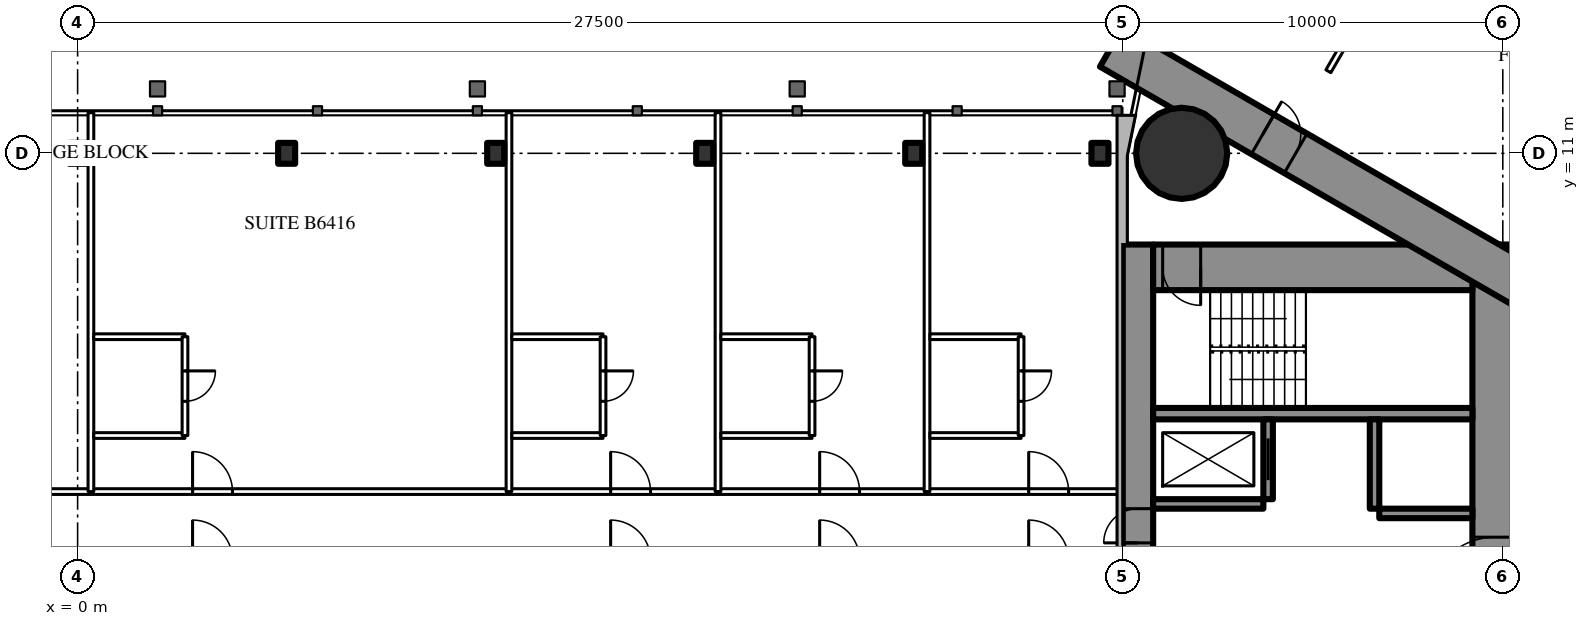
"""IFC4 building model, lengths in metres.
Left out: names, types, materials, properties, quantities, classifications, styles, units other than length and angle.
Written with IfcOpenShell. Run it as: python <this file> out.ifc"""

import sys

from ifc_helpers import new_model, si_unit, direction, frame, frame_2d, origin, origin_2d, place, context, subcontext, project, spatial, rectangle, circle, i_section, extrude, element, fill, save


model = new_model("IFC4")
c1 = context("Model", 3, precision=1e-05, world=origin(), true_north=direction((0.0, 1.0)))
c2 = subcontext(c1, "Body", "Model", "MODEL_VIEW")
j1 = project(units=[si_unit("LENGTHUNIT", "METRE"), si_unit("PLANEANGLEUNIT", "RADIAN")], contexts=[c1])
p1 = place(None, origin())
s1 = spatial("IfcSite", under=j1, at=p1, CompositionType="ELEMENT")
p2 = place(p1, origin())
s2 = spatial("IfcBuilding", under=s1, at=p2, CompositionType="ELEMENT")
p3 = place(p2, frame((0.0, 0.0, 240.5)))
s3 = spatial("IfcBuildingStorey", under=s2, at=p3, CompositionType="ELEMENT", Elevation=240.5)
p4 = place(p3, frame((29.05, 11.0, 0.0), z_axis=(0.0, 0.0, 1.0), x_axis=(1.0, 0.0, 0.0)))
e1 = element("IfcColumn", 1, at=p4, inside=s3, PredefinedType="COLUMN", context=c2, shape_type="SweptSolid", body=[
    extrude(circle(Radius=1.2, at=origin_2d()), origin(), (0.0, 0.0, 1.0), 3.6),
])
p5 = place(p3, frame((27.9, -8.6, 0.0), z_axis=(0.0, 0.0, 1.0), x_axis=(0.0, 1.0, 0.0)))
e2 = element("IfcWall", 2, at=p5, inside=s3, PredefinedType="SHEAR", context=c2, shape_type="SweptSolid", body=[
    extrude(rectangle(XDim=17.2, YDim=0.8, at=frame_2d((8.6, 0.0))), origin(), (0.0, 0.0, 1.0), 3.6),
])
p6 = place(p5, frame((9.35, 0.0, 0.0)))
e3 = element("IfcOpeningElement", 3, at=p6, cuts=e2, PredefinedType="OPENING", context=c2, shape_type="SweptSolid", body=[
    extrude(rectangle(XDim=0.9, YDim=2.2, at=frame_2d((0.45, 1.1))), frame((0.0, 0.41, 0.0), z_axis=(0.0, -1.0, 0.0), x_axis=(1.0, 0.0, 0.0)), (0.0, 0.0, 1.0), 0.82),
])
p7 = place(p3, frame((37.3, -8.6, 0.0), z_axis=(0.0, 0.0, 1.0), x_axis=(0.0, 1.0, 0.0)))
e4 = element("IfcWall", 4, at=p7, inside=s3, PredefinedType="SHEAR", context=c2, shape_type="SweptSolid", body=[
    extrude(rectangle(XDim=17.2, YDim=1.2, at=frame_2d((8.6, 0.0))), origin(), (0.0, 0.0, 1.0), 3.6),
])
p8 = place(p7, frame((7.7, 0.0, 0.0)))
e5 = element("IfcOpeningElement", 5, at=p8, cuts=e4, PredefinedType="OPENING", context=c2, shape_type="SweptSolid", body=[
    extrude(rectangle(XDim=1.8, YDim=2.2, at=frame_2d((0.9, 1.1))), frame((0.0, 0.61, 0.0), z_axis=(0.0, -1.0, 0.0), x_axis=(1.0, 0.0, 0.0)), (0.0, 0.0, 1.0), 1.22),
])
p9 = place(p3, frame((28.3, 8.0, 0.0), z_axis=(0.0, 0.0, 1.0), x_axis=(1.0, 0.0, 0.0)))
e6 = element("IfcWall", 6, at=p9, inside=s3, PredefinedType="SHEAR", context=c2, shape_type="SweptSolid", body=[
    extrude(rectangle(XDim=8.4, YDim=1.2, at=frame_2d((4.2, 0.0))), origin(), (0.0, 0.0, 1.0), 3.6),
])
p10 = place(p9, frame((0.25, 0.0, 0.0)))
e7 = element("IfcOpeningElement", 7, at=p10, cuts=e6, PredefinedType="OPENING", context=c2, shape_type="SweptSolid", body=[
    extrude(rectangle(XDim=1.0, YDim=2.2, at=frame_2d((0.5, 1.1))), frame((0.0, 0.61, 0.0), z_axis=(0.0, -1.0, 0.0), x_axis=(1.0, 0.0, 0.0)), (0.0, 0.0, 1.0), 1.22),
])
p11 = place(p3, frame((28.3, 4.15, 0.0), z_axis=(0.0, 0.0, 1.0), x_axis=(1.0, 0.0, 0.0)))
e8 = element("IfcWall", 8, at=p11, inside=s3, PredefinedType="SHEAR", context=c2, shape_type="SweptSolid", body=[
    extrude(rectangle(XDim=8.4, YDim=0.3, at=frame_2d((4.2, 0.0))), origin(), (0.0, 0.0, 1.0), 3.6),
])
p12 = place(p3, frame((31.325, 1.9, 0.0), z_axis=(0.0, 0.0, 1.0), x_axis=(0.0, 1.0, 0.0)))
e9 = element("IfcWall", 9, at=p12, inside=s3, PredefinedType="SHEAR", context=c2, shape_type="SweptSolid", body=[
    extrude(rectangle(XDim=2.1, YDim=0.25, at=frame_2d((1.05, 0.0))), origin(), (0.0, 0.0, 1.0), 3.6),
])
p13 = place(p12, frame((0.5, 0.0, 0.0)))
e10 = element("IfcOpeningElement", 10, at=p13, cuts=e9, PredefinedType="OPENING", context=c2, shape_type="SweptSolid", body=[
    extrude(rectangle(XDim=1.1, YDim=2.2, at=frame_2d((0.55, 1.1))), frame((0.0, 0.135, 0.0), z_axis=(0.0, -1.0, 0.0), x_axis=(1.0, 0.0, 0.0)), (0.0, 0.0, 1.0), 0.27),
])
p14 = place(p3, frame((34.125, 1.65, 0.0), z_axis=(0.0, 0.0, 1.0), x_axis=(0.0, 1.0, 0.0)))
e11 = element("IfcWall", 11, at=p14, inside=s3, PredefinedType="SHEAR", context=c2, shape_type="SweptSolid", body=[
    extrude(rectangle(XDim=2.35, YDim=0.25, at=frame_2d((1.175, 0.0))), origin(), (0.0, 0.0, 1.0), 3.6),
])
p15 = place(p3, frame((28.3, 1.775, 0.0), z_axis=(0.0, 0.0, 1.0), x_axis=(1.0, 0.0, 0.0)))
e12 = element("IfcWall", 12, at=p15, inside=s3, PredefinedType="SHEAR", context=c2, shape_type="SweptSolid", body=[
    extrude(rectangle(XDim=2.9, YDim=0.25, at=frame_2d((1.45, 0.0))), origin(), (0.0, 0.0, 1.0), 3.6),
])
p16 = place(p3, frame((34.25, 1.525, 0.0), z_axis=(0.0, 0.0, 1.0), x_axis=(1.0, 0.0, 0.0)))
e13 = element("IfcWall", 13, at=p16, inside=s3, PredefinedType="SHEAR", context=c2, shape_type="SweptSolid", body=[
    extrude(rectangle(XDim=2.45, YDim=0.25, at=frame_2d((1.225, 0.0))), origin(), (0.0, 0.0, 1.0), 3.6),
])
p17 = place(p3, frame((27.2, -13.8, 0.0), z_axis=(0.0, 0.0, 1.0), x_axis=(0.866027159892, 0.499996958321, 0.0)))
e14 = element("IfcWall", 14, at=p17, inside=s3, PredefinedType="SHEAR", context=c2, shape_type="SweptSolid", body=[
    extrude(rectangle(XDim=27.947, YDim=1.2, at=frame_2d((13.973, 0.0))), origin(), (0.0, 0.0, 1.0), 3.6),
])
p18 = place(p17, frame((4.6, 0.0, 0.0)))
e15 = element("IfcOpeningElement", 15, at=p18, cuts=e14, PredefinedType="OPENING", context=c2, shape_type="SweptSolid", body=[
    extrude(rectangle(XDim=1.0, YDim=2.2, at=frame_2d((0.5, 1.1))), frame((0.0, 0.61, 0.0), z_axis=(0.0, -1.0, 0.0), x_axis=(1.0, 0.0, 0.0)), (0.0, 0.0, 1.0), 1.22),
])
p19 = place(p17, frame((13.395, 0.0, 0.0)))
e16 = element("IfcOpeningElement", 16, at=p19, cuts=e14, PredefinedType="OPENING", context=c2, shape_type="SweptSolid", body=[
    extrude(rectangle(XDim=1.8, YDim=2.2, at=frame_2d((0.9, 1.1))), frame((0.0, 0.61, 0.0), z_axis=(0.0, -1.0, 0.0), x_axis=(1.0, 0.0, 0.0)), (0.0, 0.0, 1.0), 1.22),
])
p20 = place(p3, frame((27.2, 13.8, 0.0), z_axis=(0.0, 0.0, 1.0), x_axis=(0.866024515034, -0.500001539357, 0.0)))
e17 = element("IfcWall", 17, at=p20, inside=s3, PredefinedType="SHEAR", context=c2, shape_type="SweptSolid", body=[
    extrude(rectangle(XDim=26.907, YDim=1.2, at=frame_2d((13.454, 0.0))), origin(), (0.0, 0.0, 1.0), 3.6),
])
p21 = place(p20, frame((4.6, 0.0, 0.0)))
e18 = element("IfcOpeningElement", 18, at=p21, cuts=e17, PredefinedType="OPENING", context=c2, shape_type="SweptSolid", body=[
    extrude(rectangle(XDim=1.0, YDim=2.2, at=frame_2d((0.5, 1.1))), frame((0.0, 0.61, 0.0), z_axis=(0.0, -1.0, 0.0), x_axis=(1.0, 0.0, 0.0)), (0.0, 0.0, 1.0), 1.22),
])
p22 = place(p20, frame((13.395, 0.0, 0.0)))
e19 = element("IfcOpeningElement", 19, at=p22, cuts=e17, PredefinedType="OPENING", context=c2, shape_type="SweptSolid", body=[
    extrude(rectangle(XDim=1.8, YDim=2.2, at=frame_2d((0.9, 1.1))), frame((0.0, 0.61, 0.0), z_axis=(0.0, -1.0, 0.0), x_axis=(1.0, 0.0, 0.0)), (0.0, 0.0, 1.0), 1.22),
])
for number, where, z_axis, x_axis in (
    (20, (0.0, 11.0, 0.0), (0.0, 0.0, 1.0), (1.0, 0.0, 0.0)),
    (21, (5.5, 11.0, 0.0), (0.0, 0.0, 1.0), (1.0, 0.0, 0.0)),
    (22, (11.0, 11.0, 0.0), (0.0, 0.0, 1.0), (1.0, 0.0, 0.0)),
    (23, (16.5, 11.0, 0.0), (0.0, 0.0, 1.0), (1.0, 0.0, 0.0)),
    (24, (22.0, 11.0, 0.0), (0.0, 0.0, 1.0), (1.0, 0.0, 0.0)),
    (25, (26.9, 11.0, 0.0), (0.0, 0.0, 1.0), (1.0, 0.0, 0.0)),
):
    element("IfcColumn", number, at=place(p3, frame(where, z_axis=z_axis, x_axis=x_axis)), inside=s3, PredefinedType="COLUMN", context=c2, shape_type="SweptSolid", body=[
        extrude(i_section(OverallWidth=0.448, OverallDepth=0.55, WebThickness=0.072, FlangeThickness=0.115, FilletRadius=0.02, at=origin_2d()), origin(), (0.0, 0.0, 1.0), 3.6),
    ])
p23 = place(p3, frame((32.91, 13.159, 0.0), z_axis=(0.0, 0.0, 1.0), x_axis=(0.500014963534, 0.866016764412, 0.0)))
e26 = element("IfcWall", 26, at=p23, inside=s3, PredefinedType="PARTITIONING", context=c2, shape_type="SweptSolid", body=[
    extrude(rectangle(XDim=7.682, YDim=0.15, at=frame_2d((3.841, 0.0))), origin(), (0.0, 0.0, 1.0), 3.35),
])
p24 = place(p3, frame((-10.65, 2.1, 0.0), z_axis=(0.0, 0.0, 1.0), x_axis=(1.0, 0.0, 0.0)))
e27 = element("IfcWall", 27, at=p24, inside=s3, PredefinedType="PARTITIONING", context=c2, shape_type="SweptSolid", body=[
    extrude(rectangle(XDim=38.15, YDim=0.15, at=frame_2d((19.075, 0.0))), origin(), (0.0, 0.0, 1.0), 3.4),
])
p25 = place(p24, frame((2.675, 0.0, 0.0)))
e28 = element("IfcOpeningElement", 28, at=p25, cuts=e27, PredefinedType="OPENING", context=c2, shape_type="SweptSolid", body=[
    extrude(rectangle(XDim=1.05, YDim=2.4, at=frame_2d((0.525, 1.2))), frame((0.0, 0.085, 0.0), z_axis=(0.0, -1.0, 0.0), x_axis=(1.0, 0.0, 0.0)), (0.0, 0.0, 1.0), 0.17),
])
p26 = place(p24, frame((13.675, 0.0, 0.0)))
e29 = element("IfcOpeningElement", 29, at=p26, cuts=e27, PredefinedType="OPENING", context=c2, shape_type="SweptSolid", body=[
    extrude(rectangle(XDim=1.05, YDim=2.4, at=frame_2d((0.525, 1.2))), frame((0.0, 0.085, 0.0), z_axis=(0.0, -1.0, 0.0), x_axis=(1.0, 0.0, 0.0)), (0.0, 0.0, 1.0), 0.17),
])
p27 = place(p24, frame((24.675, 0.0, 0.0)))
e30 = element("IfcOpeningElement", 30, at=p27, cuts=e27, PredefinedType="OPENING", context=c2, shape_type="SweptSolid", body=[
    extrude(rectangle(XDim=1.05, YDim=2.4, at=frame_2d((0.525, 1.2))), frame((0.0, 0.085, 0.0), z_axis=(0.0, -1.0, 0.0), x_axis=(1.0, 0.0, 0.0)), (0.0, 0.0, 1.0), 0.17),
])
p28 = place(p24, frame((30.175, 0.0, 0.0)))
e31 = element("IfcOpeningElement", 31, at=p28, cuts=e27, PredefinedType="OPENING", context=c2, shape_type="SweptSolid", body=[
    extrude(rectangle(XDim=1.05, YDim=2.4, at=frame_2d((0.525, 1.2))), frame((0.0, 0.085, 0.0), z_axis=(0.0, -1.0, 0.0), x_axis=(1.0, 0.0, 0.0)), (0.0, 0.0, 1.0), 0.17),
])
p29 = place(p24, frame((35.675, 0.0, 0.0)))
e32 = element("IfcOpeningElement", 32, at=p29, cuts=e27, PredefinedType="OPENING", context=c2, shape_type="SweptSolid", body=[
    extrude(rectangle(XDim=1.05, YDim=2.4, at=frame_2d((0.525, 1.2))), frame((0.0, 0.085, 0.0), z_axis=(0.0, -1.0, 0.0), x_axis=(1.0, 0.0, 0.0)), (0.0, 0.0, 1.0), 0.17),
])
for number, where, z_axis, x_axis in (
    (33, (0.35, 2.1, 0.0), (0.0, 0.0, 1.0), (0.0, 1.0, 0.0)),
    (34, (11.35, 2.1, 0.0), (0.0, 0.0, 1.0), (0.0, 1.0, 0.0)),
    (35, (16.85, 2.1, 0.0), (0.0, 0.0, 1.0), (0.0, 1.0, 0.0)),
    (36, (22.35, 2.1, 0.0), (0.0, 0.0, 1.0), (0.0, 1.0, 0.0)),
):
    element("IfcWall", number, at=place(p3, frame(where, z_axis=z_axis, x_axis=x_axis)), inside=s3, PredefinedType="PARTITIONING", context=c2, shape_type="SweptSolid", body=[
        extrude(rectangle(XDim=9.97, YDim=0.15, at=frame_2d((4.985, 0.0))), origin(), (0.0, 0.0, 1.0), 3.4),
    ])
for number, where, z_axis, x_axis in (
    (37, (0.425, 6.175, 0.0), (0.0, 0.0, 1.0), (1.0, 0.0, 0.0)),
    (38, (0.425, 3.575, 0.0), (0.0, 0.0, 1.0), (1.0, 0.0, 0.0)),
):
    element("IfcWall", number, at=place(p3, frame(where, z_axis=z_axis, x_axis=x_axis)), inside=s3, PredefinedType="PARTITIONING", context=c2, shape_type="SweptSolid", body=[
        extrude(rectangle(XDim=2.4, YDim=0.15, at=frame_2d((1.2, 0.0))), origin(), (0.0, 0.0, 1.0), 3.4),
    ])
p30 = place(p3, frame((2.825, 3.575, 0.0), z_axis=(0.0, 0.0, 1.0), x_axis=(0.0, 1.0, 0.0)))
e39 = element("IfcWall", 39, at=p30, inside=s3, PredefinedType="PARTITIONING", context=c2, shape_type="SweptSolid", body=[
    extrude(rectangle(XDim=2.6, YDim=0.15, at=frame_2d((1.3, 0.0))), origin(), (0.0, 0.0, 1.0), 3.4),
])
p31 = place(p30, frame((0.9, 0.0, 0.0)))
e40 = element("IfcOpeningElement", 40, at=p31, cuts=e39, PredefinedType="OPENING", context=c2, shape_type="SweptSolid", body=[
    extrude(rectangle(XDim=0.8, YDim=2.2, at=frame_2d((0.4, 1.1))), frame((0.0, 0.085, 0.0), z_axis=(0.0, -1.0, 0.0), x_axis=(1.0, 0.0, 0.0)), (0.0, 0.0, 1.0), 0.17),
])
for number, where, z_axis, x_axis in (
    (41, (11.425, 6.175, 0.0), (0.0, 0.0, 1.0), (1.0, 0.0, 0.0)),
    (42, (11.425, 3.575, 0.0), (0.0, 0.0, 1.0), (1.0, 0.0, 0.0)),
):
    element("IfcWall", number, at=place(p3, frame(where, z_axis=z_axis, x_axis=x_axis)), inside=s3, PredefinedType="PARTITIONING", context=c2, shape_type="SweptSolid", body=[
        extrude(rectangle(XDim=2.4, YDim=0.15, at=frame_2d((1.2, 0.0))), origin(), (0.0, 0.0, 1.0), 3.4),
    ])
p32 = place(p3, frame((13.825, 3.575, 0.0), z_axis=(0.0, 0.0, 1.0), x_axis=(0.0, 1.0, 0.0)))
e43 = element("IfcWall", 43, at=p32, inside=s3, PredefinedType="PARTITIONING", context=c2, shape_type="SweptSolid", body=[
    extrude(rectangle(XDim=2.6, YDim=0.15, at=frame_2d((1.3, 0.0))), origin(), (0.0, 0.0, 1.0), 3.4),
])
p33 = place(p32, frame((0.9, 0.0, 0.0)))
e44 = element("IfcOpeningElement", 44, at=p33, cuts=e43, PredefinedType="OPENING", context=c2, shape_type="SweptSolid", body=[
    extrude(rectangle(XDim=0.8, YDim=2.2, at=frame_2d((0.4, 1.1))), frame((0.0, 0.085, 0.0), z_axis=(0.0, -1.0, 0.0), x_axis=(1.0, 0.0, 0.0)), (0.0, 0.0, 1.0), 0.17),
])
for number, where, z_axis, x_axis in (
    (45, (16.925, 6.175, 0.0), (0.0, 0.0, 1.0), (1.0, 0.0, 0.0)),
    (46, (16.925, 3.575, 0.0), (0.0, 0.0, 1.0), (1.0, 0.0, 0.0)),
):
    element("IfcWall", number, at=place(p3, frame(where, z_axis=z_axis, x_axis=x_axis)), inside=s3, PredefinedType="PARTITIONING", context=c2, shape_type="SweptSolid", body=[
        extrude(rectangle(XDim=2.4, YDim=0.15, at=frame_2d((1.2, 0.0))), origin(), (0.0, 0.0, 1.0), 3.4),
    ])
p34 = place(p3, frame((19.325, 3.575, 0.0), z_axis=(0.0, 0.0, 1.0), x_axis=(0.0, 1.0, 0.0)))
e47 = element("IfcWall", 47, at=p34, inside=s3, PredefinedType="PARTITIONING", context=c2, shape_type="SweptSolid", body=[
    extrude(rectangle(XDim=2.6, YDim=0.15, at=frame_2d((1.3, 0.0))), origin(), (0.0, 0.0, 1.0), 3.4),
])
p35 = place(p34, frame((0.9, 0.0, 0.0)))
e48 = element("IfcOpeningElement", 48, at=p35, cuts=e47, PredefinedType="OPENING", context=c2, shape_type="SweptSolid", body=[
    extrude(rectangle(XDim=0.8, YDim=2.2, at=frame_2d((0.4, 1.1))), frame((0.0, 0.085, 0.0), z_axis=(0.0, -1.0, 0.0), x_axis=(1.0, 0.0, 0.0)), (0.0, 0.0, 1.0), 0.17),
])
for number, where, z_axis, x_axis in (
    (49, (22.425, 6.175, 0.0), (0.0, 0.0, 1.0), (1.0, 0.0, 0.0)),
    (50, (22.425, 3.575, 0.0), (0.0, 0.0, 1.0), (1.0, 0.0, 0.0)),
):
    element("IfcWall", number, at=place(p3, frame(where, z_axis=z_axis, x_axis=x_axis)), inside=s3, PredefinedType="PARTITIONING", context=c2, shape_type="SweptSolid", body=[
        extrude(rectangle(XDim=2.4, YDim=0.15, at=frame_2d((1.2, 0.0))), origin(), (0.0, 0.0, 1.0), 3.4),
    ])
p36 = place(p3, frame((24.825, 3.575, 0.0), z_axis=(0.0, 0.0, 1.0), x_axis=(0.0, 1.0, 0.0)))
e51 = element("IfcWall", 51, at=p36, inside=s3, PredefinedType="PARTITIONING", context=c2, shape_type="SweptSolid", body=[
    extrude(rectangle(XDim=2.6, YDim=0.15, at=frame_2d((1.3, 0.0))), origin(), (0.0, 0.0, 1.0), 3.4),
])
p37 = place(p36, frame((0.9, 0.0, 0.0)))
e52 = element("IfcOpeningElement", 52, at=p37, cuts=e51, PredefinedType="OPENING", context=c2, shape_type="SweptSolid", body=[
    extrude(rectangle(XDim=0.8, YDim=2.2, at=frame_2d((0.4, 1.1))), frame((0.0, 0.085, 0.0), z_axis=(0.0, -1.0, 0.0), x_axis=(1.0, 0.0, 0.0)), (0.0, 0.0, 1.0), 0.17),
])
p38 = place(p21, origin())
e53 = element("IfcDoor", 53, at=p38, inside=s3, OperationType="SINGLE_SWING_LEFT", PredefinedType="DOOR", context=c2, shape_type="SweptSolid", body=[
    extrude(rectangle(XDim=1.0, YDim=2.2, at=frame_2d((0.5, 1.1))), frame((0.0, 0.025, 0.0), z_axis=(0.0, -1.0, 0.0), x_axis=(1.0, 0.0, 0.0)), (0.0, 0.0, 1.0), 0.05),
])
fill(e18, e53)
p39 = place(p8, origin())
e54 = element("IfcDoor", 54, at=p39, inside=s3, OperationType="DOUBLE_DOOR_SINGLE_SWING", PredefinedType="DOOR", context=c2, shape_type="SweptSolid", body=[
    extrude(rectangle(XDim=1.8, YDim=2.2, at=frame_2d((0.9, 1.1))), frame((0.0, 0.025, 0.0), z_axis=(0.0, -1.0, 0.0), x_axis=(1.0, 0.0, 0.0)), (0.0, 0.0, 1.0), 0.05),
])
fill(e5, e54)
p40 = place(p10, origin())
e55 = element("IfcDoor", 55, at=p40, inside=s3, OperationType="SINGLE_SWING_RIGHT", PredefinedType="DOOR", context=c2, shape_type="SweptSolid", body=[
    extrude(rectangle(XDim=1.0, YDim=2.2, at=frame_2d((0.5, 1.1))), frame((0.0, 0.025, 0.0), z_axis=(0.0, -1.0, 0.0), x_axis=(1.0, 0.0, 0.0)), (0.0, 0.0, 1.0), 0.05),
])
fill(e7, e55)
p41 = place(p6, origin())
e56 = element("IfcDoor", 56, at=p41, inside=s3, OperationType="SINGLE_SWING_LEFT", PredefinedType="DOOR", context=c2, shape_type="SweptSolid", body=[
    extrude(rectangle(XDim=0.9, YDim=2.2, at=frame_2d((0.45, 1.1))), frame((0.0, 0.025, 0.0), z_axis=(0.0, -1.0, 0.0), x_axis=(1.0, 0.0, 0.0)), (0.0, 0.0, 1.0), 0.05),
])
fill(e3, e56)
p42 = place(p31, origin())
e57 = element("IfcDoor", 57, at=p42, inside=s3, OperationType="SINGLE_SWING_RIGHT", PredefinedType="DOOR", context=c2, shape_type="SweptSolid", body=[
    extrude(rectangle(XDim=0.8, YDim=2.2, at=frame_2d((0.4, 1.1))), frame((0.0, 0.025, 0.0), z_axis=(0.0, -1.0, 0.0), x_axis=(1.0, 0.0, 0.0)), (0.0, 0.0, 1.0), 0.05),
])
fill(e40, e57)
p43 = place(p26, origin())
e58 = element("IfcDoor", 58, at=p43, inside=s3, OperationType="SINGLE_SWING_LEFT", PredefinedType="DOOR", context=c2, shape_type="SweptSolid", body=[
    extrude(rectangle(XDim=1.05, YDim=2.4, at=frame_2d((0.525, 1.2))), frame((0.0, 0.025, 0.0), z_axis=(0.0, -1.0, 0.0), x_axis=(1.0, 0.0, 0.0)), (0.0, 0.0, 1.0), 0.05),
])
fill(e29, e58)
p44 = place(p33, origin())
e59 = element("IfcDoor", 59, at=p44, inside=s3, OperationType="SINGLE_SWING_RIGHT", PredefinedType="DOOR", context=c2, shape_type="SweptSolid", body=[
    extrude(rectangle(XDim=0.8, YDim=2.2, at=frame_2d((0.4, 1.1))), frame((0.0, 0.025, 0.0), z_axis=(0.0, -1.0, 0.0), x_axis=(1.0, 0.0, 0.0)), (0.0, 0.0, 1.0), 0.05),
])
fill(e44, e59)
p45 = place(p27, origin())
e60 = element("IfcDoor", 60, at=p45, inside=s3, OperationType="SINGLE_SWING_LEFT", PredefinedType="DOOR", context=c2, shape_type="SweptSolid", body=[
    extrude(rectangle(XDim=1.05, YDim=2.4, at=frame_2d((0.525, 1.2))), frame((0.0, 0.025, 0.0), z_axis=(0.0, -1.0, 0.0), x_axis=(1.0, 0.0, 0.0)), (0.0, 0.0, 1.0), 0.05),
])
fill(e30, e60)
p46 = place(p35, origin())
e61 = element("IfcDoor", 61, at=p46, inside=s3, OperationType="SINGLE_SWING_RIGHT", PredefinedType="DOOR", context=c2, shape_type="SweptSolid", body=[
    extrude(rectangle(XDim=0.8, YDim=2.2, at=frame_2d((0.4, 1.1))), frame((0.0, 0.025, 0.0), z_axis=(0.0, -1.0, 0.0), x_axis=(1.0, 0.0, 0.0)), (0.0, 0.0, 1.0), 0.05),
])
fill(e48, e61)
p47 = place(p28, origin())
e62 = element("IfcDoor", 62, at=p47, inside=s3, OperationType="SINGLE_SWING_LEFT", PredefinedType="DOOR", context=c2, shape_type="SweptSolid", body=[
    extrude(rectangle(XDim=1.05, YDim=2.4, at=frame_2d((0.525, 1.2))), frame((0.0, 0.025, 0.0), z_axis=(0.0, -1.0, 0.0), x_axis=(1.0, 0.0, 0.0)), (0.0, 0.0, 1.0), 0.05),
])
fill(e31, e62)
p48 = place(p37, origin())
e63 = element("IfcDoor", 63, at=p48, inside=s3, OperationType="SINGLE_SWING_RIGHT", PredefinedType="DOOR", context=c2, shape_type="SweptSolid", body=[
    extrude(rectangle(XDim=0.8, YDim=2.2, at=frame_2d((0.4, 1.1))), frame((0.0, 0.025, 0.0), z_axis=(0.0, -1.0, 0.0), x_axis=(1.0, 0.0, 0.0)), (0.0, 0.0, 1.0), 0.05),
])
fill(e52, e63)
p49 = place(p29, origin())
e64 = element("IfcDoor", 64, at=p49, inside=s3, OperationType="SINGLE_SWING_LEFT", PredefinedType="DOOR", context=c2, shape_type="SweptSolid", body=[
    extrude(rectangle(XDim=1.05, YDim=2.4, at=frame_2d((0.525, 1.2))), frame((0.0, 0.025, 0.0), z_axis=(0.0, -1.0, 0.0), x_axis=(1.0, 0.0, 0.0)), (0.0, 0.0, 1.0), 0.05),
])
fill(e32, e64)
p50 = place(p13, origin())
e65 = element("IfcDoor", 65, at=p50, inside=s3, OperationType="SLIDING_TO_LEFT", PredefinedType="USERDEFINED", context=c2, shape_type="SweptSolid", body=[
    extrude(rectangle(XDim=1.1, YDim=2.2, at=frame_2d((0.55, 1.1))), frame((0.0, 0.025, 0.0), z_axis=(0.0, -1.0, 0.0), x_axis=(1.0, 0.0, 0.0)), (0.0, 0.0, 1.0), 0.05),
])
fill(e10, e65)
save(model, sys.argv[1])
